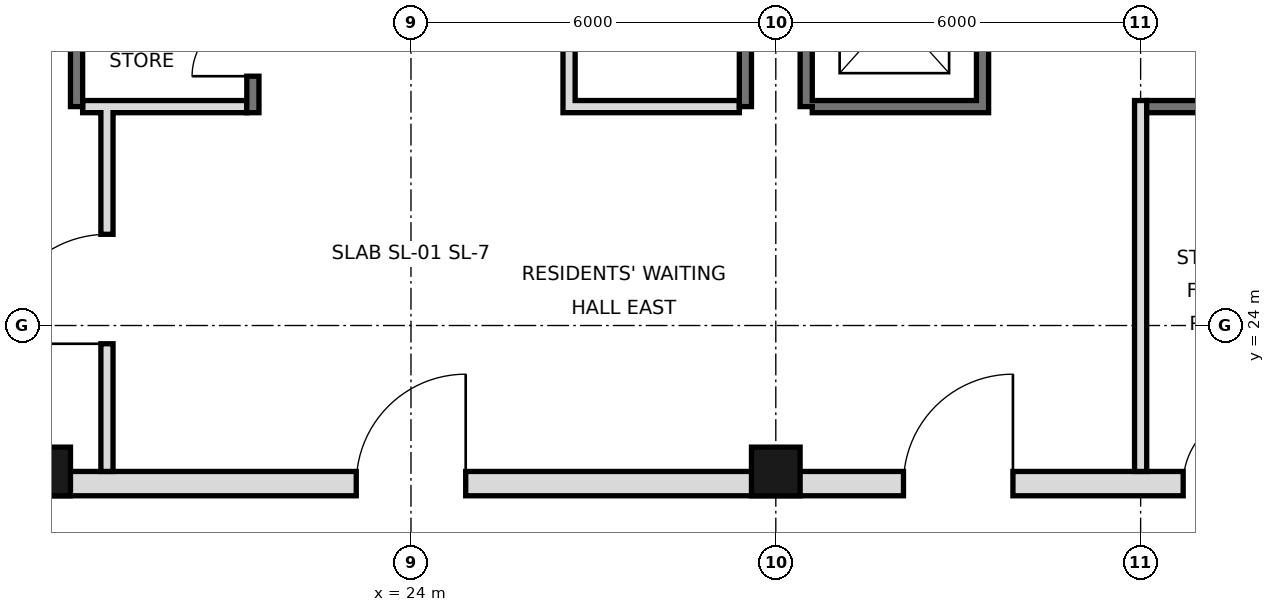
"""IFC4 building model, lengths in metres.
Left out: names, types, materials, properties, quantities, classifications, styles, units other than length and angle.
Written with IfcOpenShell. Run it as: python <this file> out.ifc"""

import sys

from ifc_helpers import new_model, si_unit, direction, frame, frame_2d, origin, origin_2d, place, context, subcontext, project, spatial, rectangle, hollow_rectangle, extrude, element, fill, save


model = new_model("IFC4")
c1 = context("Model", 3, precision=1e-05, world=origin(), true_north=direction((0.0, 1.0)))
c2 = subcontext(c1, "Body", "Model", "MODEL_VIEW")
j1 = project(units=[si_unit("LENGTHUNIT", "METRE"), si_unit("PLANEANGLEUNIT", "RADIAN")], contexts=[c1])
p1 = place(None, origin())
s1 = spatial("IfcSite", under=j1, at=p1, CompositionType="ELEMENT")
p2 = place(p1, origin())
s2 = spatial("IfcBuilding", under=s1, at=p2, CompositionType="ELEMENT")
p3 = place(p2, frame((0.0, 0.0, 323.2)))
s3 = spatial("IfcBuildingStorey", under=s2, at=p3, CompositionType="ELEMENT", Elevation=323.2)
for number, where, z_axis, x_axis in (
    (1, (18.0, 21.6, 0.0), (0.0, 0.0, 1.0), (1.0, 0.0, 0.0)),
    (2, (30.0, 21.6, 0.0), (0.0, 0.0, 1.0), (1.0, 0.0, 0.0)),
):
    element("IfcColumn", number, at=place(p3, frame(where, z_axis=z_axis, x_axis=x_axis)), inside=s3, PredefinedType="COLUMN", context=c2, shape_type="SweptSolid", body=[
        extrude(hollow_rectangle(XDim=0.8, YDim=0.8, WallThickness=0.025, at=origin_2d()), origin(), (0.0, 0.0, 1.0), 3.6),
    ])
for number, where, z_axis, x_axis in (
    (3, (18.5, 27.6, 0.0), (0.0, 0.0, 1.0), (0.0, 1.0, 0.0)),
    (4, (29.5, 27.6, 0.0), (0.0, 0.0, 1.0), (0.0, 1.0, 0.0)),
    (5, (30.5, 27.6, 0.0), (0.0, 0.0, 1.0), (0.0, 1.0, 0.0)),
):
    element("IfcWall", number, at=place(p3, frame(where, z_axis=z_axis, x_axis=x_axis)), inside=s3, PredefinedType="SOLIDWALL", context=c2, shape_type="SweptSolid", body=[
        extrude(rectangle(XDim=17.5, YDim=0.2, at=frame_2d((8.75, 0.0))), origin(), (0.0, 0.0, 1.0), 3.42),
    ])
p4 = place(p3, frame((5.6, 21.4, 0.0), z_axis=(0.0, 0.0, 1.0), x_axis=(1.0, 0.0, 0.0)))
e6 = element("IfcWall", 6, at=p4, inside=s3, PredefinedType="SOLIDWALL", context=c2, shape_type="SweptSolid", body=[
    extrude(rectangle(XDim=36.8, YDim=0.4, at=frame_2d((18.4, 0.0))), origin(), (0.0, 0.0, 1.0), 3.42),
])
p5 = place(p4, frame((8.5, 0.0, 0.0)))
e7 = element("IfcOpeningElement", 7, at=p5, cuts=e6, PredefinedType="OPENING", context=c2, shape_type="SweptSolid", body=[
    extrude(rectangle(XDim=1.8, YDim=2.1, at=frame_2d((0.9, 1.05))), frame((0.0, 0.21, 0.0), z_axis=(0.0, -1.0, 0.0), x_axis=(1.0, 0.0, 0.0)), (0.0, 0.0, 1.0), 0.42),
])
p6 = place(p4, frame((17.5, 0.0, 0.0)))
e8 = element("IfcOpeningElement", 8, at=p6, cuts=e6, PredefinedType="OPENING", context=c2, shape_type="SweptSolid", body=[
    extrude(rectangle(XDim=1.8, YDim=2.1, at=frame_2d((0.9, 1.05))), frame((0.0, 0.21, 0.0), z_axis=(0.0, -1.0, 0.0), x_axis=(1.0, 0.0, 0.0)), (0.0, 0.0, 1.0), 0.42),
])
p7 = place(p4, frame((26.5, 0.0, 0.0)))
e9 = element("IfcOpeningElement", 9, at=p7, cuts=e6, PredefinedType="OPENING", context=c2, shape_type="SweptSolid", body=[
    extrude(rectangle(XDim=1.8, YDim=2.1, at=frame_2d((0.9, 1.05))), frame((0.0, 0.21, 0.0), z_axis=(0.0, -1.0, 0.0), x_axis=(1.0, 0.0, 0.0)), (0.0, 0.0, 1.0), 0.42),
])
p8 = place(p4, frame((4.5, 0.0, 0.0)))
e10 = element("IfcOpeningElement", 10, at=p8, cuts=e6, PredefinedType="OPENING", context=c2, shape_type="SweptSolid", body=[
    extrude(rectangle(XDim=1.2, YDim=2.1, at=frame_2d((0.6, 1.05))), frame((0.0, 0.21, 0.0), z_axis=(0.0, -1.0, 0.0), x_axis=(1.0, 0.0, 0.0)), (0.0, 0.0, 1.0), 0.42),
])
p9 = place(p4, frame((31.1, 0.0, 0.0)))
e11 = element("IfcOpeningElement", 11, at=p9, cuts=e6, PredefinedType="OPENING", context=c2, shape_type="SweptSolid", body=[
    extrude(rectangle(XDim=1.2, YDim=2.1, at=frame_2d((0.6, 1.05))), frame((0.0, 0.21, 0.0), z_axis=(0.0, -1.0, 0.0), x_axis=(1.0, 0.0, 0.0)), (0.0, 0.0, 1.0), 0.42),
])
p10 = place(p3, frame((19.0, 21.6, 0.0), z_axis=(0.0, 0.0, 1.0), x_axis=(0.0, 1.0, 0.0)))
e12 = element("IfcWall", 12, at=p10, inside=s3, PredefinedType="PARTITIONING", context=c2, shape_type="SweptSolid", body=[
    extrude(rectangle(XDim=6.0, YDim=0.2, at=frame_2d((3.0, 0.0))), origin(), (0.0, 0.0, 1.0), 3.42),
])
p11 = place(p10, frame((2.1, 0.0, 0.0)))
e13 = element("IfcOpeningElement", 13, at=p11, cuts=e12, PredefinedType="OPENING", context=c2, shape_type="SweptSolid", body=[
    extrude(rectangle(XDim=1.8, YDim=2.1, at=frame_2d((0.9, 1.05))), frame((0.0, 0.11, 0.0), z_axis=(0.0, -1.0, 0.0), x_axis=(1.0, 0.0, 0.0)), (0.0, 0.0, 1.0), 0.22),
])
p12 = place(p3, frame((21.4, 27.5, 0.0), z_axis=(0.0, 0.0, 1.0), x_axis=(0.0, 1.0, 0.0)))
e14 = element("IfcWall", 14, at=p12, inside=s3, PredefinedType="SOLIDWALL", context=c2, shape_type="SweptSolid", body=[
    extrude(rectangle(XDim=17.5, YDim=0.2, at=frame_2d((8.75, 0.0))), origin(), (0.0, 0.0, 1.0), 3.42),
])
p13 = place(p12, frame((0.6, 0.0, 0.0)))
e15 = element("IfcOpeningElement", 15, at=p13, cuts=e14, PredefinedType="OPENING", context=c2, shape_type="SweptSolid", body=[
    extrude(rectangle(XDim=1.0, YDim=2.1, at=frame_2d((0.5, 1.05))), frame((0.0, 0.11, 0.0), z_axis=(0.0, -1.0, 0.0), x_axis=(1.0, 0.0, 0.0)), (0.0, 0.0, 1.0), 0.22),
])
p14 = place(p12, frame((3.7, 0.0, 0.0)))
e16 = element("IfcOpeningElement", 16, at=p14, cuts=e14, PredefinedType="OPENING", context=c2, shape_type="SweptSolid", body=[
    extrude(rectangle(XDim=1.0, YDim=2.1, at=frame_2d((0.5, 1.05))), frame((0.0, 0.11, 0.0), z_axis=(0.0, -1.0, 0.0), x_axis=(1.0, 0.0, 0.0)), (0.0, 0.0, 1.0), 0.22),
])
p15 = place(p12, frame((16.2, 0.0, 0.0)))
e17 = element("IfcOpeningElement", 17, at=p15, cuts=e14, PredefinedType="OPENING", context=c2, shape_type="SweptSolid", body=[
    extrude(rectangle(XDim=1.0, YDim=2.1, at=frame_2d((0.5, 1.05))), frame((0.0, 0.11, 0.0), z_axis=(0.0, -1.0, 0.0), x_axis=(1.0, 0.0, 0.0)), (0.0, 0.0, 1.0), 0.22),
])
p16 = place(p12, frame((7.4, 0.0, 0.0)))
e18 = element("IfcOpeningElement", 18, at=p16, cuts=e14, PredefinedType="OPENING", context=c2, shape_type="SweptSolid", body=[
    extrude(rectangle(XDim=0.9, YDim=2.1, at=frame_2d((0.45, 1.05))), frame((0.0, 0.11, 0.0), z_axis=(0.0, -1.0, 0.0), x_axis=(1.0, 0.0, 0.0)), (0.0, 0.0, 1.0), 0.22),
])
p17 = place(p3, frame((26.6, 27.5, 0.0), z_axis=(0.0, 0.0, 1.0), x_axis=(0.0, 1.0, 0.0)))
e19 = element("IfcWall", 19, at=p17, inside=s3, PredefinedType="SOLIDWALL", context=c2, shape_type="SweptSolid", body=[
    extrude(rectangle(XDim=17.5, YDim=0.2, at=frame_2d((8.75, 0.0))), origin(), (0.0, 0.0, 1.0), 3.42),
])
p18 = place(p17, frame((4.3, 0.0, 0.0)))
e20 = element("IfcOpeningElement", 20, at=p18, cuts=e19, PredefinedType="OPENING", context=c2, shape_type="SweptSolid", body=[
    extrude(rectangle(XDim=0.9, YDim=2.1, at=frame_2d((0.45, 1.05))), frame((0.0, 0.11, 0.0), z_axis=(0.0, -1.0, 0.0), x_axis=(1.0, 0.0, 0.0)), (0.0, 0.0, 1.0), 0.22),
])
p19 = place(p17, frame((10.35, 0.0, 0.0)))
e21 = element("IfcOpeningElement", 21, at=p19, cuts=e19, PredefinedType="OPENING", context=c2, shape_type="SweptSolid", body=[
    extrude(rectangle(XDim=1.0, YDim=2.1, at=frame_2d((0.5, 1.05))), frame((0.0, 0.11, 0.0), z_axis=(0.0, -1.0, 0.0), x_axis=(1.0, 0.0, 0.0)), (0.0, 0.0, 1.0), 0.22),
])
p20 = place(p3, frame((33.4, 27.5, 0.0), z_axis=(0.0, 0.0, 1.0), x_axis=(0.0, 1.0, 0.0)))
e22 = element("IfcWall", 22, at=p20, inside=s3, PredefinedType="SOLIDWALL", context=c2, shape_type="SweptSolid", body=[
    extrude(rectangle(XDim=17.5, YDim=0.2, at=frame_2d((8.75, 0.0))), origin(), (0.0, 0.0, 1.0), 3.42),
])
p21 = place(p20, frame((1.1, 0.0, 0.0)))
e23 = element("IfcOpeningElement", 23, at=p21, cuts=e22, PredefinedType="OPENING", context=c2, shape_type="SweptSolid", body=[
    extrude(rectangle(XDim=1.1, YDim=2.1, at=frame_2d((0.55, 1.05))), frame((0.0, 0.11, 0.0), z_axis=(0.0, -1.0, 0.0), x_axis=(1.0, 0.0, 0.0)), (0.0, 0.0, 1.0), 0.22),
])
p22 = place(p20, frame((4.2, 0.0, 0.0)))
e24 = element("IfcOpeningElement", 24, at=p22, cuts=e22, PredefinedType="OPENING", context=c2, shape_type="SweptSolid", body=[
    extrude(rectangle(XDim=1.1, YDim=2.1, at=frame_2d((0.55, 1.05))), frame((0.0, 0.11, 0.0), z_axis=(0.0, -1.0, 0.0), x_axis=(1.0, 0.0, 0.0)), (0.0, 0.0, 1.0), 0.22),
])
p23 = place(p20, frame((15.4, 0.0, 0.0)))
e25 = element("IfcOpeningElement", 25, at=p23, cuts=e22, PredefinedType="OPENING", context=c2, shape_type="SweptSolid", body=[
    extrude(rectangle(XDim=1.1, YDim=2.1, at=frame_2d((0.55, 1.05))), frame((0.0, 0.11, 0.0), z_axis=(0.0, -1.0, 0.0), x_axis=(1.0, 0.0, 0.0)), (0.0, 0.0, 1.0), 0.22),
])
p24 = place(p20, frame((9.9, 0.0, 0.0)))
e26 = element("IfcOpeningElement", 26, at=p24, cuts=e22, PredefinedType="OPENING", context=c2, shape_type="SweptSolid", body=[
    extrude(rectangle(XDim=0.9, YDim=2.1, at=frame_2d((0.45, 1.05))), frame((0.0, 0.11, 0.0), z_axis=(0.0, -1.0, 0.0), x_axis=(1.0, 0.0, 0.0)), (0.0, 0.0, 1.0), 0.22),
])
p25 = place(p3, frame((36.0, 21.6, 0.0), z_axis=(0.0, 0.0, 1.0), x_axis=(0.0, 1.0, 0.0)))
e27 = element("IfcWall", 27, at=p25, inside=s3, PredefinedType="PARTITIONING", context=c2, shape_type="SweptSolid", body=[
    extrude(rectangle(XDim=6.1, YDim=0.2, at=frame_2d((3.05, 0.0))), origin(), (0.0, 0.0, 1.0), 3.42),
])
p26 = place(p3, frame((18.6, 27.6, 0.0), z_axis=(0.0, 0.0, 1.0), x_axis=(1.0, 0.0, 0.0)))
e28 = element("IfcWall", 28, at=p26, inside=s3, PredefinedType="PARTITIONING", context=c2, shape_type="SweptSolid", body=[
    extrude(rectangle(XDim=2.7, YDim=0.2, at=frame_2d((1.35, 0.0))), origin(), (0.0, 0.0, 1.0), 3.42),
])
for number, where, z_axis, x_axis in (
    (29, (26.7, 27.6, 0.0), (0.0, 0.0, 1.0), (1.0, 0.0, 0.0)),
    (30, (30.6, 27.6, 0.0), (0.0, 0.0, 1.0), (1.0, 0.0, 0.0)),
):
    element("IfcWall", number, at=place(p3, frame(where, z_axis=z_axis, x_axis=x_axis)), inside=s3, PredefinedType="SOLIDWALL", context=c2, shape_type="SweptSolid", body=[
        extrude(rectangle(XDim=2.7, YDim=0.2, at=frame_2d((1.35, 0.0))), origin(), (0.0, 0.0, 1.0), 3.42),
    ])
p27 = place(p3, frame((36.1, 27.6, 0.0), z_axis=(0.0, 0.0, 1.0), x_axis=(1.0, 0.0, 0.0)))
e31 = element("IfcWall", 31, at=p27, inside=s3, PredefinedType="SOLIDWALL", context=c2, shape_type="SweptSolid", body=[
    extrude(rectangle(XDim=5.3, YDim=0.2, at=frame_2d((2.65, 0.0))), origin(), (0.0, 0.0, 1.0), 3.42),
])
p28 = place(p11, origin())
e32 = element("IfcDoor", 32, at=p28, inside=s3, OperationType="SINGLE_SWING_LEFT", PredefinedType="DOOR", context=c2, shape_type="SweptSolid", body=[
    extrude(rectangle(XDim=1.8, YDim=2.1, at=frame_2d((0.9, 1.05))), frame((0.0, 0.025, 0.0), z_axis=(0.0, -1.0, 0.0), x_axis=(1.0, 0.0, 0.0)), (0.0, 0.0, 1.0), 0.05),
])
fill(e13, e32)
p29 = place(p6, frame((1.8, 0.0, 0.0), z_axis=(0.0, 0.0, 1.0), x_axis=(-1.0, 0.0, 0.0)))
e33 = element("IfcDoor", 33, at=p29, inside=s3, OperationType="SINGLE_SWING_LEFT", PredefinedType="DOOR", context=c2, shape_type="SweptSolid", body=[
    extrude(rectangle(XDim=1.8, YDim=2.1, at=frame_2d((0.9, 1.05))), frame((0.0, 0.025, 0.0), z_axis=(0.0, -1.0, 0.0), x_axis=(1.0, 0.0, 0.0)), (0.0, 0.0, 1.0), 0.05),
])
fill(e8, e33)
p30 = place(p7, frame((1.8, 0.0, 0.0), z_axis=(0.0, 0.0, 1.0), x_axis=(-1.0, 0.0, 0.0)))
e34 = element("IfcDoor", 34, at=p30, inside=s3, OperationType="SINGLE_SWING_LEFT", PredefinedType="DOOR", context=c2, shape_type="SweptSolid", body=[
    extrude(rectangle(XDim=1.8, YDim=2.1, at=frame_2d((0.9, 1.05))), frame((0.0, 0.025, 0.0), z_axis=(0.0, -1.0, 0.0), x_axis=(1.0, 0.0, 0.0)), (0.0, 0.0, 1.0), 0.05),
])
fill(e9, e34)
p31 = place(p9, frame((1.2, 0.0, 0.0), z_axis=(0.0, 0.0, 1.0), x_axis=(-1.0, 0.0, 0.0)))
e35 = element("IfcDoor", 35, at=p31, inside=s3, OperationType="SINGLE_SWING_LEFT", PredefinedType="DOOR", context=c2, shape_type="SweptSolid", body=[
    extrude(rectangle(XDim=1.2, YDim=2.1, at=frame_2d((0.6, 1.05))), frame((0.0, 0.025, 0.0), z_axis=(0.0, -1.0, 0.0), x_axis=(1.0, 0.0, 0.0)), (0.0, 0.0, 1.0), 0.05),
])
fill(e11, e35)
p32 = place(p13, origin())
e36 = element("IfcDoor", 36, at=p32, inside=s3, OperationType="SINGLE_SWING_LEFT", PredefinedType="DOOR", context=c2, shape_type="SweptSolid", body=[
    extrude(rectangle(XDim=1.0, YDim=2.1, at=frame_2d((0.5, 1.05))), frame((0.0, 0.025, 0.0), z_axis=(0.0, -1.0, 0.0), x_axis=(1.0, 0.0, 0.0)), (0.0, 0.0, 1.0), 0.05),
])
fill(e15, e36)
save(model, sys.argv[1])
